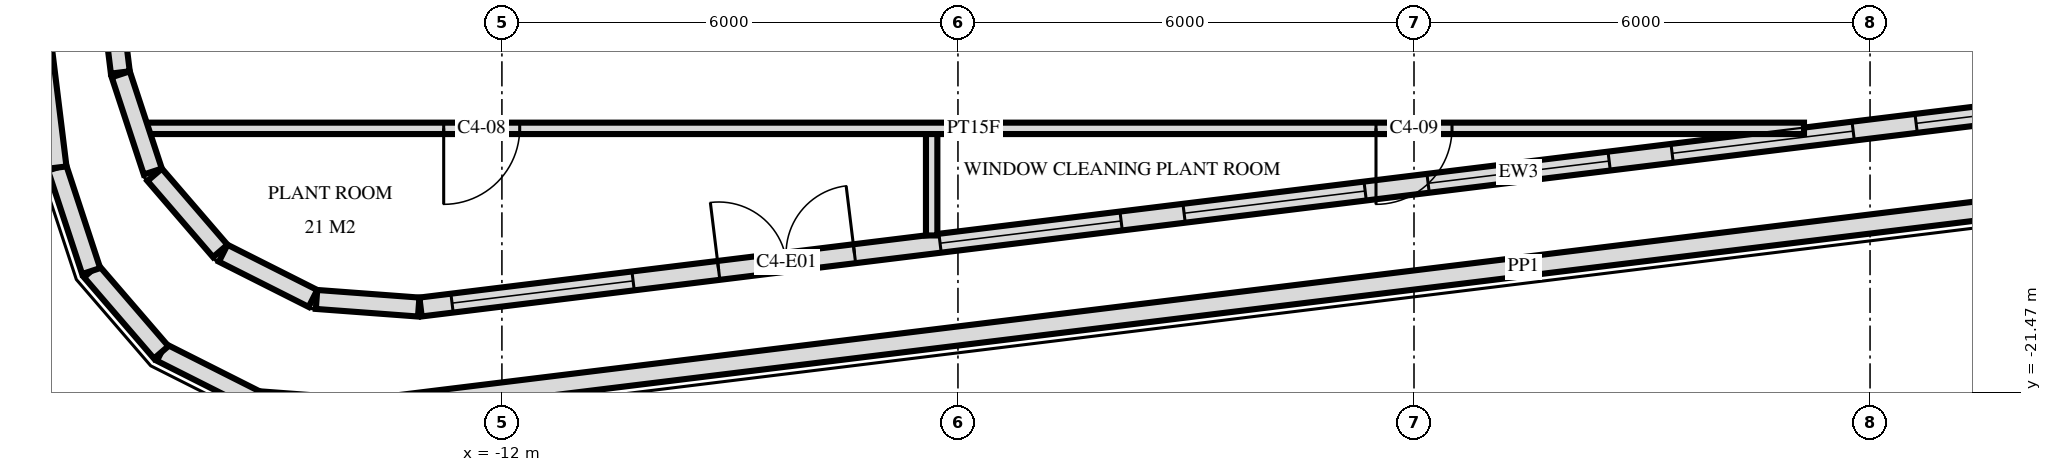
"""IFC4 building model, lengths in metres.
Left out: names, types, materials, properties, quantities, classifications, styles, units other than length and angle.
Written with IfcOpenShell. Run it as: python <this file> out.ifc"""

import sys

from ifc_helpers import new_model, si_unit, direction, frame, frame_2d, origin, place, context, subcontext, project, spatial, rectangle, extrude, element, fill, save


model = new_model("IFC4")
c1 = context("Model", 3, precision=1e-05, world=origin(), true_north=direction((0.0, 1.0)))
c2 = subcontext(c1, "Body", "Model", "MODEL_VIEW")
j1 = project(units=[si_unit("LENGTHUNIT", "METRE"), si_unit("PLANEANGLEUNIT", "RADIAN")], contexts=[c1])
p1 = place(None, origin())
s1 = spatial("IfcSite", under=j1, at=p1, CompositionType="ELEMENT")
p2 = place(p1, origin())
s2 = spatial("IfcBuilding", under=s1, at=p2, CompositionType="ELEMENT")
p3 = place(p2, frame((0.0, 0.0, 357.4)))
s3 = spatial("IfcBuildingStorey", under=s2, at=p3, CompositionType="ELEMENT", Elevation=357.4)
p4 = place(p3, frame((-18.91, -1.877, 0.0), z_axis=(0.0, 0.0, 1.0), x_axis=(0.121859728622, -0.992547332141, 0.0)))
e1 = element("IfcWall", 1, at=p4, inside=s3, PredefinedType="SOLIDWALL", context=c2, shape_type="SweptSolid", body=[
    extrude(rectangle(XDim=15.503, YDim=0.25, at=frame_2d((7.751, 0.0))), origin(), (0.0, 0.0, 1.0), 5.59),
])
p5 = place(p4, frame((0.35, 0.0, 0.838)))
e2 = element("IfcOpeningElement", 2, at=p5, cuts=e1, PredefinedType="OPENING", context=c2, shape_type="SweptSolid", body=[
    extrude(rectangle(XDim=2.4, YDim=3.6, at=frame_2d((1.2, 1.8))), frame((0.0, 0.135, 0.0), z_axis=(0.0, -1.0, 0.0), x_axis=(1.0, 0.0, 0.0)), (0.0, 0.0, 1.0), 0.27),
])
p6 = place(p4, frame((3.451, 0.0, 0.838)))
e3 = element("IfcOpeningElement", 3, at=p6, cuts=e1, PredefinedType="OPENING", context=c2, shape_type="SweptSolid", body=[
    extrude(rectangle(XDim=2.4, YDim=3.6, at=frame_2d((1.2, 1.8))), frame((0.0, 0.135, 0.0), z_axis=(0.0, -1.0, 0.0), x_axis=(1.0, 0.0, 0.0)), (0.0, 0.0, 1.0), 0.27),
])
p7 = place(p4, frame((6.552, 0.0, 0.838)))
e4 = element("IfcOpeningElement", 4, at=p7, cuts=e1, PredefinedType="OPENING", context=c2, shape_type="SweptSolid", body=[
    extrude(rectangle(XDim=2.4, YDim=3.6, at=frame_2d((1.2, 1.8))), frame((0.0, 0.135, 0.0), z_axis=(0.0, -1.0, 0.0), x_axis=(1.0, 0.0, 0.0)), (0.0, 0.0, 1.0), 0.27),
])
p8 = place(p4, frame((9.652, 0.0, 0.838)))
e5 = element("IfcOpeningElement", 5, at=p8, cuts=e1, PredefinedType="OPENING", context=c2, shape_type="SweptSolid", body=[
    extrude(rectangle(XDim=2.4, YDim=3.6, at=frame_2d((1.2, 1.8))), frame((0.0, 0.135, 0.0), z_axis=(0.0, -1.0, 0.0), x_axis=(1.0, 0.0, 0.0)), (0.0, 0.0, 1.0), 0.27),
])
p9 = place(p4, frame((12.752, 0.0, 0.838)))
e6 = element("IfcOpeningElement", 6, at=p9, cuts=e1, PredefinedType="OPENING", context=c2, shape_type="SweptSolid", body=[
    extrude(rectangle(XDim=2.4, YDim=3.6, at=frame_2d((1.2, 1.8))), frame((0.0, 0.135, 0.0), z_axis=(0.0, -1.0, 0.0), x_axis=(1.0, 0.0, 0.0)), (0.0, 0.0, 1.0), 0.27),
])
p10 = place(p3, frame((-17.015, -17.288, 0.0), z_axis=(0.0, 0.0, 1.0), x_axis=(0.313183064829, -0.949692775535, 0.0)))
e7 = element("IfcWall", 7, at=p10, inside=s3, PredefinedType="SOLIDWALL", context=c2, shape_type="SweptSolid", body=[
    extrude(rectangle(XDim=1.348, YDim=0.25, at=frame_2d((0.674, 0.0))), origin(), (0.0, 0.0, 1.0), 5.59),
])
p11 = place(p3, frame((-16.569, -18.611, 0.0), z_axis=(0.0, 0.0, 1.0), x_axis=(0.652735106061, -0.757586220384, 0.0)))
e8 = element("IfcWall", 8, at=p11, inside=s3, PredefinedType="SOLIDWALL", context=c2, shape_type="SweptSolid", body=[
    extrude(rectangle(XDim=1.323, YDim=0.25, at=frame_2d((0.661, 0.0))), origin(), (0.0, 0.0, 1.0), 5.59),
])
p12 = place(p3, frame((-15.667, -19.643, 0.0), z_axis=(0.0, 0.0, 1.0), x_axis=(0.893019948066, -0.450017080071, 0.0)))
e9 = element("IfcWall", 9, at=p12, inside=s3, PredefinedType="SOLIDWALL", context=c2, shape_type="SweptSolid", body=[
    extrude(rectangle(XDim=1.323, YDim=0.25, at=frame_2d((0.661, 0.0))), origin(), (0.0, 0.0, 1.0), 5.59),
])
p13 = place(p3, frame((-14.439, -20.251, 0.0), z_axis=(0.0, 0.0, 1.0), x_axis=(0.99723901669, -0.074258626379, 0.0)))
e10 = element("IfcWall", 10, at=p13, inside=s3, PredefinedType="SOLIDWALL", context=c2, shape_type="SweptSolid", body=[
    extrude(rectangle(XDim=1.348, YDim=0.25, at=frame_2d((0.674, 0.0))), origin(), (0.0, 0.0, 1.0), 5.59),
])
p14 = place(p3, frame((-13.07, -20.351, 0.0), z_axis=(0.0, 0.0, 1.0), x_axis=(0.992546587848, 0.121865790738, 0.0)))
e11 = element("IfcWall", 11, at=p14, inside=s3, PredefinedType="SOLIDWALL", context=c2, shape_type="SweptSolid", body=[
    extrude(rectangle(XDim=29.111, YDim=0.25, at=frame_2d((14.555, 0.0))), origin(), (0.0, 0.0, 1.0), 5.59),
])
p15 = place(p14, frame((0.417, 0.0, 0.838)))
e12 = element("IfcOpeningElement", 12, at=p15, cuts=e11, PredefinedType="OPENING", context=c2, shape_type="SweptSolid", body=[
    extrude(rectangle(XDim=2.4, YDim=3.6, at=frame_2d((1.2, 1.8))), frame((0.0, 0.135, 0.0), z_axis=(0.0, -1.0, 0.0), x_axis=(1.0, 0.0, 0.0)), (0.0, 0.0, 1.0), 0.27),
])
p16 = place(p14, frame((3.952, 0.0, 0.0)))
e13 = element("IfcOpeningElement", 13, at=p16, cuts=e11, PredefinedType="OPENING", context=c2, shape_type="SweptSolid", body=[
    extrude(rectangle(XDim=1.8, YDim=2.4, at=frame_2d((0.9, 1.2))), frame((0.0, 0.135, 0.0), z_axis=(0.0, -1.0, 0.0), x_axis=(1.0, 0.0, 0.0)), (0.0, 0.0, 1.0), 0.27),
])
p17 = place(p14, frame((6.886, 0.0, 0.838)))
e14 = element("IfcOpeningElement", 14, at=p17, cuts=e11, PredefinedType="OPENING", context=c2, shape_type="SweptSolid", body=[
    extrude(rectangle(XDim=2.4, YDim=3.6, at=frame_2d((1.2, 1.8))), frame((0.0, 0.135, 0.0), z_axis=(0.0, -1.0, 0.0), x_axis=(1.0, 0.0, 0.0)), (0.0, 0.0, 1.0), 0.27),
])
p18 = place(p14, frame((10.121, 0.0, 0.838)))
e15 = element("IfcOpeningElement", 15, at=p18, cuts=e11, PredefinedType="OPENING", context=c2, shape_type="SweptSolid", body=[
    extrude(rectangle(XDim=2.4, YDim=3.6, at=frame_2d((1.2, 1.8))), frame((0.0, 0.135, 0.0), z_axis=(0.0, -1.0, 0.0), x_axis=(1.0, 0.0, 0.0)), (0.0, 0.0, 1.0), 0.27),
])
p19 = place(p14, frame((13.355, 0.0, 0.838)))
e16 = element("IfcOpeningElement", 16, at=p19, cuts=e11, PredefinedType="OPENING", context=c2, shape_type="SweptSolid", body=[
    extrude(rectangle(XDim=2.4, YDim=3.6, at=frame_2d((1.2, 1.8))), frame((0.0, 0.135, 0.0), z_axis=(0.0, -1.0, 0.0), x_axis=(1.0, 0.0, 0.0)), (0.0, 0.0, 1.0), 0.27),
])
p20 = place(p14, frame((16.59, 0.0, 0.838)))
e17 = element("IfcOpeningElement", 17, at=p20, cuts=e11, PredefinedType="OPENING", context=c2, shape_type="SweptSolid", body=[
    extrude(rectangle(XDim=2.4, YDim=3.6, at=frame_2d((1.2, 1.8))), frame((0.0, 0.135, 0.0), z_axis=(0.0, -1.0, 0.0), x_axis=(1.0, 0.0, 0.0)), (0.0, 0.0, 1.0), 0.27),
])
p21 = place(p14, frame((19.824, 0.0, 0.838)))
e18 = element("IfcOpeningElement", 18, at=p21, cuts=e11, PredefinedType="OPENING", context=c2, shape_type="SweptSolid", body=[
    extrude(rectangle(XDim=2.4, YDim=3.6, at=frame_2d((1.2, 1.8))), frame((0.0, 0.135, 0.0), z_axis=(0.0, -1.0, 0.0), x_axis=(1.0, 0.0, 0.0)), (0.0, 0.0, 1.0), 0.27),
])
p22 = place(p14, frame((23.059, 0.0, 0.838)))
e19 = element("IfcOpeningElement", 19, at=p22, cuts=e11, PredefinedType="OPENING", context=c2, shape_type="SweptSolid", body=[
    extrude(rectangle(XDim=2.4, YDim=3.6, at=frame_2d((1.2, 1.8))), frame((0.0, 0.135, 0.0), z_axis=(0.0, -1.0, 0.0), x_axis=(1.0, 0.0, 0.0)), (0.0, 0.0, 1.0), 0.27),
])
p23 = place(p14, frame((26.293, 0.0, 0.838)))
e20 = element("IfcOpeningElement", 20, at=p23, cuts=e11, PredefinedType="OPENING", context=c2, shape_type="SweptSolid", body=[
    extrude(rectangle(XDim=2.4, YDim=3.6, at=frame_2d((1.2, 1.8))), frame((0.0, 0.135, 0.0), z_axis=(0.0, -1.0, 0.0), x_axis=(1.0, 0.0, 0.0)), (0.0, 0.0, 1.0), 0.27),
])
p24 = place(p3, frame((16.673, -17.948, 0.0), z_axis=(0.0, 0.0, 1.0), x_axis=(-0.992546915756, -0.121863120032, 0.0)))
e21 = element("IfcWall", 21, at=p24, inside=s3, PredefinedType="PARAPET", context=c2, shape_type="SweptSolid", body=[
    extrude(rectangle(XDim=30.694, YDim=0.25, at=frame_2d((15.347, 0.0))), origin(), (0.0, 0.0, 1.0), 1.1),
])
p25 = place(p3, frame((-13.792, -21.689, 0.0), z_axis=(0.0, 0.0, 1.0), x_axis=(-0.997240743077, 0.074235438617, 0.0)))
e22 = element("IfcWall", 22, at=p25, inside=s3, PredefinedType="PARAPET", context=c2, shape_type="SweptSolid", body=[
    extrude(rectangle(XDim=1.434, YDim=0.25, at=frame_2d((0.717, 0.0))), origin(), (0.0, 0.0, 1.0), 1.1),
])
for number, where, z_axis, x_axis in (
    (23, (-15.222, -21.583, 0.0), (0.0, 0.0, 1.0), (-0.893, 0.45, 0.0)),
    (24, (-16.483, -20.947, 0.0), (0.0, 0.0, 1.0), (-0.653, 0.758, 0.0)),
):
    element("IfcWall", number, at=place(p3, frame(where, z_axis=z_axis, x_axis=x_axis)), inside=s3, PredefinedType="PARAPET", context=c2, shape_type="SweptSolid", body=[
        extrude(rectangle(XDim=1.412, YDim=0.25, at=frame_2d((0.706, 0.0))), origin(), (0.0, 0.0, 1.0), 1.1),
    ])
p26 = place(p3, frame((-17.404, -19.878, 0.0), z_axis=(0.0, 0.0, 1.0), x_axis=(-0.313160918809, 0.949700078409, 0.0)))
e25 = element("IfcWall", 25, at=p26, inside=s3, PredefinedType="PARAPET", context=c2, shape_type="SweptSolid", body=[
    extrude(rectangle(XDim=1.434, YDim=0.25, at=frame_2d((0.717, 0.0))), origin(), (0.0, 0.0, 1.0), 1.1),
])
p27 = place(p3, frame((-17.853, -18.516, 0.0), z_axis=(0.0, 0.0, 1.0), x_axis=(-0.12186213875, 0.992547036235, 0.0)))
e26 = element("IfcWall", 26, at=p27, inside=s3, PredefinedType="PARAPET", context=c2, shape_type="SweptSolid", body=[
    extrude(rectangle(XDim=16.35, YDim=0.25, at=frame_2d((8.175, 0.0))), origin(), (0.0, 0.0, 1.0), 1.1),
])
p28 = place(p3, frame((-6.346, -19.409, 0.0), z_axis=(0.0, 0.0, 1.0), x_axis=(0.0, 1.0, 0.0)))
e27 = element("IfcWall", 27, at=p28, inside=s3, PredefinedType="PARTITIONING", context=c2, shape_type="SweptSolid", body=[
    extrude(rectangle(XDim=1.409, YDim=0.15, at=frame_2d((0.705, 0.0))), origin(), (0.0, 0.0, 1.0), 5.72),
])
p29 = place(p3, frame((-16.722, -18.0, 0.0), z_axis=(0.0, 0.0, 1.0), x_axis=(1.0, 0.0, 0.0)))
e28 = element("IfcWall", 28, at=p29, inside=s3, PredefinedType="PARTITIONING", context=c2, shape_type="SweptSolid", body=[
    extrude(rectangle(XDim=21.854, YDim=0.15, at=frame_2d((10.927, 0.0))), origin(), (0.0, 0.0, 1.0), 5.72),
])
p30 = place(p29, frame((3.957, 0.0, 0.0)))
e29 = element("IfcOpeningElement", 29, at=p30, cuts=e28, PredefinedType="OPENING", context=c2, shape_type="SweptSolid", body=[
    extrude(rectangle(XDim=1.0, YDim=2.1, at=frame_2d((0.5, 1.05))), frame((0.0, 0.085, 0.0), z_axis=(0.0, -1.0, 0.0), x_axis=(1.0, 0.0, 0.0)), (0.0, 0.0, 1.0), 0.17),
])
p31 = place(p29, frame((16.222, 0.0, 0.0)))
e30 = element("IfcOpeningElement", 30, at=p31, cuts=e28, PredefinedType="OPENING", context=c2, shape_type="SweptSolid", body=[
    extrude(rectangle(XDim=1.0, YDim=2.1, at=frame_2d((0.5, 1.05))), frame((0.0, 0.085, 0.0), z_axis=(0.0, -1.0, 0.0), x_axis=(1.0, 0.0, 0.0)), (0.0, 0.0, 1.0), 0.17),
])
p32 = place(p15, origin())
e31 = element("IfcWindow", 31, at=p32, inside=s3, PartitioningType="SINGLE_PANEL", PredefinedType="USERDEFINED", context=c2, shape_type="SweptSolid", body=[
    extrude(rectangle(XDim=2.4, YDim=3.6, at=frame_2d((1.2, 1.8))), frame((0.0, 0.03, 0.0), z_axis=(0.0, -1.0, 0.0), x_axis=(1.0, 0.0, 0.0)), (0.0, 0.0, 1.0), 0.06),
])
fill(e12, e31)
p33 = place(p16, origin())
e32 = element("IfcDoor", 32, at=p33, inside=s3, OperationType="DOUBLE_DOOR_SINGLE_SWING", PredefinedType="DOOR", context=c2, shape_type="SweptSolid", body=[
    extrude(rectangle(XDim=1.8, YDim=2.4, at=frame_2d((0.9, 1.2))), frame((0.0, 0.025, 0.0), z_axis=(0.0, -1.0, 0.0), x_axis=(1.0, 0.0, 0.0)), (0.0, 0.0, 1.0), 0.05),
])
fill(e13, e32)
p34 = place(p17, origin())
e33 = element("IfcWindow", 33, at=p34, inside=s3, PartitioningType="SINGLE_PANEL", PredefinedType="USERDEFINED", context=c2, shape_type="SweptSolid", body=[
    extrude(rectangle(XDim=2.4, YDim=3.6, at=frame_2d((1.2, 1.8))), frame((0.0, 0.03, 0.0), z_axis=(0.0, -1.0, 0.0), x_axis=(1.0, 0.0, 0.0)), (0.0, 0.0, 1.0), 0.06),
])
fill(e14, e33)
p35 = place(p18, origin())
e34 = element("IfcWindow", 34, at=p35, inside=s3, PartitioningType="SINGLE_PANEL", PredefinedType="USERDEFINED", context=c2, shape_type="SweptSolid", body=[
    extrude(rectangle(XDim=2.4, YDim=3.6, at=frame_2d((1.2, 1.8))), frame((0.0, 0.03, 0.0), z_axis=(0.0, -1.0, 0.0), x_axis=(1.0, 0.0, 0.0)), (0.0, 0.0, 1.0), 0.06),
])
fill(e15, e34)
p36 = place(p19, origin())
e35 = element("IfcWindow", 35, at=p36, inside=s3, PartitioningType="SINGLE_PANEL", PredefinedType="USERDEFINED", context=c2, shape_type="SweptSolid", body=[
    extrude(rectangle(XDim=2.4, YDim=3.6, at=frame_2d((1.2, 1.8))), frame((0.0, 0.03, 0.0), z_axis=(0.0, -1.0, 0.0), x_axis=(1.0, 0.0, 0.0)), (0.0, 0.0, 1.0), 0.06),
])
fill(e16, e35)
p37 = place(p20, origin())
e36 = element("IfcWindow", 36, at=p37, inside=s3, PartitioningType="SINGLE_PANEL", PredefinedType="USERDEFINED", context=c2, shape_type="SweptSolid", body=[
    extrude(rectangle(XDim=2.4, YDim=3.6, at=frame_2d((1.2, 1.8))), frame((0.0, 0.03, 0.0), z_axis=(0.0, -1.0, 0.0), x_axis=(1.0, 0.0, 0.0)), (0.0, 0.0, 1.0), 0.06),
])
fill(e17, e36)
p38 = place(p21, origin())
e37 = element("IfcWindow", 37, at=p38, inside=s3, PartitioningType="SINGLE_PANEL", PredefinedType="USERDEFINED", context=c2, shape_type="SweptSolid", body=[
    extrude(rectangle(XDim=2.4, YDim=3.6, at=frame_2d((1.2, 1.8))), frame((0.0, 0.03, 0.0), z_axis=(0.0, -1.0, 0.0), x_axis=(1.0, 0.0, 0.0)), (0.0, 0.0, 1.0), 0.06),
])
fill(e18, e37)
p39 = place(p30, frame((0.5, 0.0, 0.0), z_axis=(0.0, 0.0, 1.0), x_axis=(-1.0, 0.0, 0.0)))
e38 = element("IfcDoor", 38, at=p39, inside=s3, OperationType="SINGLE_SWING_LEFT", PredefinedType="DOOR", context=c2, shape_type="SweptSolid", body=[
    extrude(rectangle(XDim=1.0, YDim=2.1, at=frame_2d((0.0, 1.05))), frame((0.0, -0.025, 0.0), z_axis=(0.0, 1.0, 0.0), x_axis=(-1.0, 0.0, 0.0)), (0.0, 0.0, 1.0), 0.05),
])
fill(e29, e38)
p40 = place(p31, frame((0.5, 0.0, 0.0), z_axis=(0.0, 0.0, 1.0), x_axis=(-1.0, 0.0, 0.0)))
e39 = element("IfcDoor", 39, at=p40, inside=s3, OperationType="SINGLE_SWING_LEFT", PredefinedType="DOOR", context=c2, shape_type="SweptSolid", body=[
    extrude(rectangle(XDim=1.0, YDim=2.1, at=frame_2d((0.0, 1.05))), frame((0.0, -0.025, 0.0), z_axis=(0.0, 1.0, 0.0), x_axis=(-1.0, 0.0, 0.0)), (0.0, 0.0, 1.0), 0.05),
])
fill(e30, e39)
save(model, sys.argv[1])
